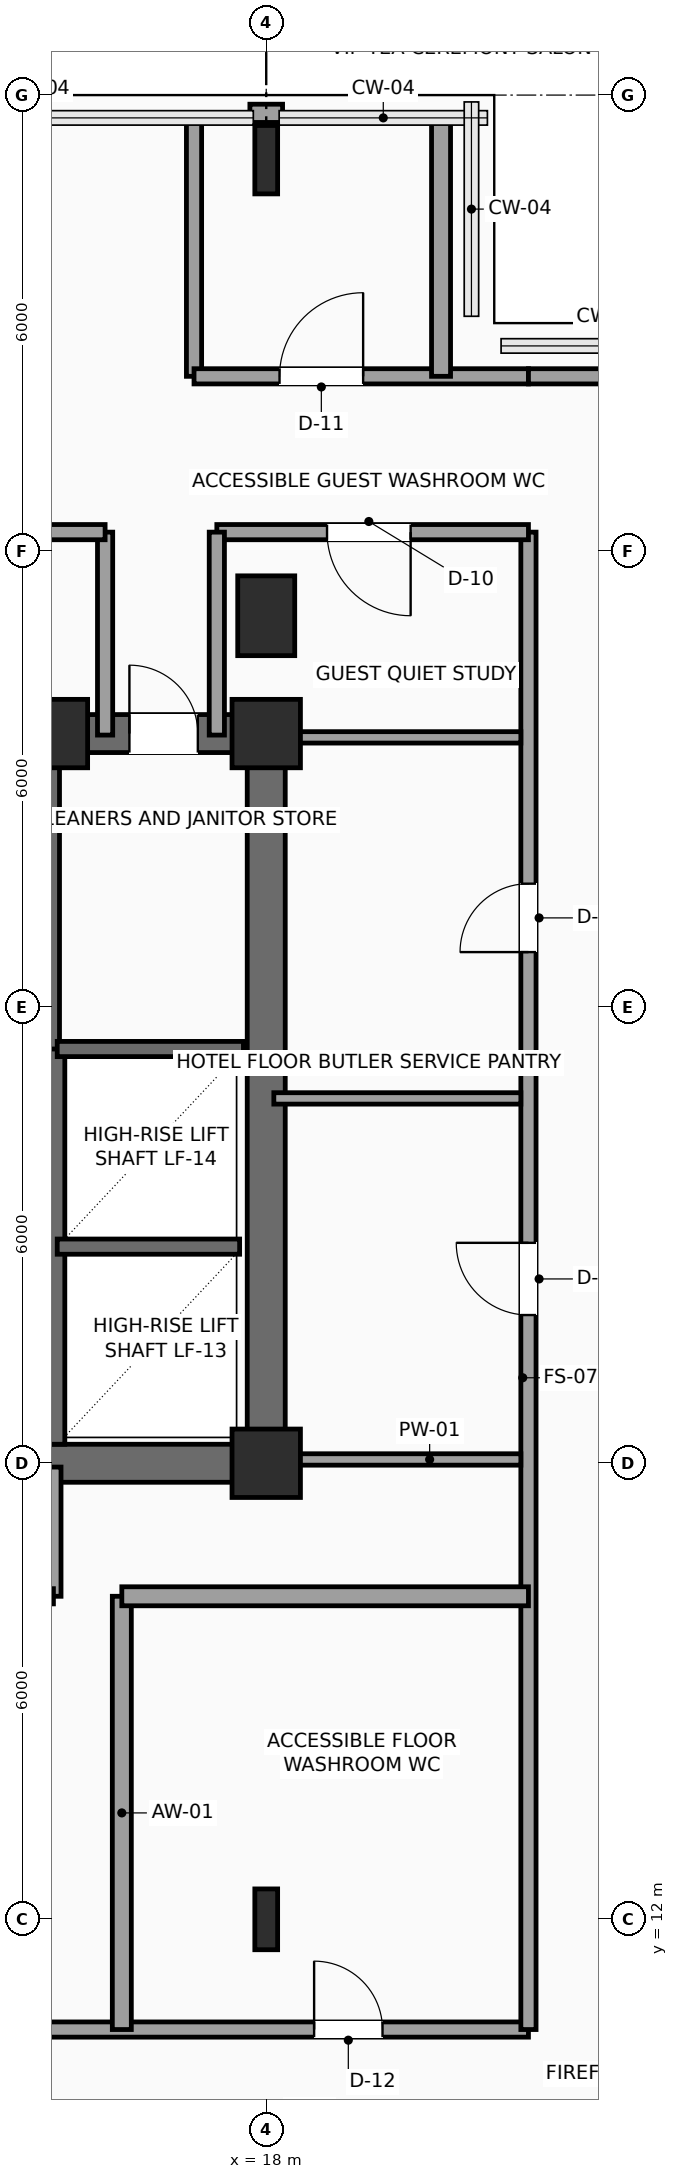
"""IFC4 building model, lengths in metres.
Left out: names, types, materials, properties, quantities, classifications, styles, units other than length and angle.
Written with IfcOpenShell. Run it as: python <this file> out.ifc"""

import sys

from ifc_helpers import new_model, si_unit, direction, frame, frame_2d, origin, origin_2d, place, context, subcontext, project, spatial, rectangle, i_section, extrude, element, fill, save


model = new_model("IFC4")
c1 = context("Model", 3, precision=1e-05, world=origin(), true_north=direction((0.0, 1.0)))
c2 = subcontext(c1, "Body", "Model", "MODEL_VIEW")
j1 = project(units=[si_unit("LENGTHUNIT", "METRE"), si_unit("PLANEANGLEUNIT", "RADIAN")], contexts=[c1])
p1 = place(None, origin())
s1 = spatial("IfcSite", under=j1, at=p1, CompositionType="ELEMENT")
p2 = place(p1, origin())
s2 = spatial("IfcBuilding", under=s1, at=p2, CompositionType="ELEMENT")
p3 = place(p2, frame((0.0, 0.0, 180.45)))
s3 = spatial("IfcBuildingStorey", under=s2, at=p3, CompositionType="ELEMENT", Elevation=180.45)
for number, where, z_axis, x_axis in (
    (1, (18.0, 18.0, 0.0), (0.0, 0.0, 1.0), (1.0, 0.0, 0.0)),
    (2, (15.2, 27.6, 0.0), (0.0, 0.0, 1.0), (1.0, 0.0, 0.0)),
    (3, (18.0, 27.6, 0.0), (0.0, 0.0, 1.0), (1.0, 0.0, 0.0)),
):
    element("IfcColumn", number, at=place(p3, frame(where, z_axis=z_axis, x_axis=x_axis)), inside=s3, PredefinedType="COLUMN", context=c2, shape_type="SweptSolid", body=[
        extrude(rectangle(XDim=0.9, YDim=0.9, at=origin_2d()), origin(), (0.0, 0.0, 1.0), 3.75),
    ])
p4 = place(p3, frame((18.0, 12.0, 0.0), z_axis=(0.0, 0.0, 1.0), x_axis=(1.0, 0.0, 0.0)))
e4 = element("IfcColumn", 4, at=p4, inside=s3, PredefinedType="COLUMN", context=c2, shape_type="SweptSolid", body=[
    extrude(i_section(OverallWidth=0.3, OverallDepth=0.8, WebThickness=0.018, FlangeThickness=0.033, FilletRadius=0.03, at=origin_2d()), origin(), (0.0, 0.0, 1.0), 3.75),
])
p5 = place(p3, frame((18.0, 29.15, 0.0), z_axis=(0.0, 0.0, 1.0), x_axis=(1.0, 0.0, 0.0)))
e5 = element("IfcColumn", 5, at=p5, inside=s3, PredefinedType="COLUMN", context=c2, shape_type="SweptSolid", body=[
    extrude(rectangle(XDim=0.75, YDim=1.05, at=origin_2d()), origin(), (0.0, 0.0, 1.0), 3.75),
])
p6 = place(p3, frame((18.0, 35.15, 0.0), z_axis=(0.0, 0.0, 1.0), x_axis=(1.0, 0.0, 0.0)))
e6 = element("IfcColumn", 6, at=p6, inside=s3, PredefinedType="COLUMN", context=c2, shape_type="SweptSolid", body=[
    extrude(i_section(OverallWidth=0.3, OverallDepth=0.9, WebThickness=0.019, FlangeThickness=0.035, FilletRadius=0.03, at=origin_2d()), origin(), (0.0, 0.0, 1.0), 3.75),
])
p7 = place(p3, frame((17.785, 35.76, 0.0), z_axis=(0.0, 0.0, 1.0), x_axis=(1.0, 0.0, 0.0)))
e7 = element("IfcWall", 7, at=p7, inside=s3, PredefinedType="SOLIDWALL", context=c2, shape_type="SweptSolid", body=[
    extrude(rectangle(XDim=0.43, YDim=0.24, at=frame_2d((0.215, 0.0))), origin(), (0.0, 0.0, 1.0), 3.54),
])
p8 = place(p3, frame((6.0, 18.0, 0.0), z_axis=(0.0, 0.0, 1.0), x_axis=(1.0, 0.0, 0.0)))
e8 = element("IfcWall", 8, at=p8, inside=s3, PredefinedType="SHEAR", context=c2, shape_type="SweptSolid", body=[
    extrude(rectangle(XDim=12.0, YDim=0.5, at=frame_2d((6.0, 0.0))), origin(), (0.0, 0.0, 1.0), 3.54),
])
p9 = place(p8, frame((7.15, 0.0, 0.0)))
e9 = element("IfcOpeningElement", 9, at=p9, cuts=e8, PredefinedType="OPENING", context=c2, shape_type="SweptSolid", body=[
    extrude(rectangle(XDim=1.6, YDim=2.3, at=frame_2d((0.8, 1.15))), frame((0.0, 0.26, 0.0), z_axis=(0.0, -1.0, 0.0), x_axis=(1.0, 0.0, 0.0)), (0.0, 0.0, 1.0), 0.52),
])
p10 = place(p3, frame((6.0, 27.6, 0.0), z_axis=(0.0, 0.0, 1.0), x_axis=(1.0, 0.0, 0.0)))
e10 = element("IfcWall", 10, at=p10, inside=s3, PredefinedType="SHEAR", context=c2, shape_type="SweptSolid", body=[
    extrude(rectangle(XDim=12.0, YDim=0.5, at=frame_2d((6.0, 0.0))), origin(), (0.0, 0.0, 1.0), 3.54),
])
p11 = place(p10, frame((10.2, 0.0, 0.0)))
e11 = element("IfcOpeningElement", 11, at=p11, cuts=e10, PredefinedType="OPENING", context=c2, shape_type="SweptSolid", body=[
    extrude(rectangle(XDim=0.9, YDim=2.15, at=frame_2d((0.45, 1.075))), frame((0.0, 0.26, 0.0), z_axis=(0.0, -1.0, 0.0), x_axis=(1.0, 0.0, 0.0)), (0.0, 0.0, 1.0), 0.52),
])
p12 = place(p3, frame((18.0, 18.0, 0.0), z_axis=(0.0, 0.0, 1.0), x_axis=(0.0, 1.0, 0.0)))
e12 = element("IfcWall", 12, at=p12, inside=s3, PredefinedType="SHEAR", context=c2, shape_type="SweptSolid", body=[
    extrude(rectangle(XDim=9.6, YDim=0.5, at=frame_2d((4.8, 0.0))), origin(), (0.0, 0.0, 1.0), 3.54),
])
p13 = place(p3, frame((15.18, 23.26, 0.0), z_axis=(0.0, 0.0, 1.0), x_axis=(0.0, 1.0, 0.0)))
e13 = element("IfcWall", 13, at=p13, inside=s3, PredefinedType="SHEAR", context=c2, shape_type="SweptSolid", body=[
    extrude(rectangle(XDim=4.04, YDim=0.2, at=frame_2d((2.02, 0.0))), origin(), (0.0, 0.0, 1.0), 3.54),
])
p14 = place(p3, frame((15.25, 18.25, 0.0), z_axis=(0.0, 0.0, 1.0), x_axis=(0.0, 1.0, 0.0)))
e14 = element("IfcWall", 14, at=p14, inside=s3, PredefinedType="SHEAR", context=c2, shape_type="SweptSolid", body=[
    extrude(rectangle(XDim=5.2, YDim=0.2, at=frame_2d((2.6, 0.0))), origin(), (0.0, 0.0, 1.0), 3.54),
])
p15 = place(p3, frame((15.25, 20.85, 0.0), z_axis=(0.0, 0.0, 1.0), x_axis=(1.0, 0.0, 0.0)))
e15 = element("IfcWall", 15, at=p15, inside=s3, PredefinedType="SHEAR", context=c2, shape_type="SweptSolid", body=[
    extrude(rectangle(XDim=2.4, YDim=0.2, at=frame_2d((1.2, 0.0))), origin(), (0.0, 0.0, 1.0), 3.54),
])
p16 = place(p3, frame((15.25, 23.45, 0.0), z_axis=(0.0, 0.0, 1.0), x_axis=(1.0, 0.0, 0.0)))
e16 = element("IfcWall", 16, at=p16, inside=s3, PredefinedType="SHEAR", context=c2, shape_type="SweptSolid", body=[
    extrude(rectangle(XDim=2.45, YDim=0.2, at=frame_2d((1.225, 0.0))), origin(), (0.0, 0.0, 1.0), 3.54),
])
p17 = place(p3, frame((15.2, 17.95, 0.0), z_axis=(0.0, 0.0, 1.0), x_axis=(0.0, -1.0, 0.0)))
e17 = element("IfcWall", 17, at=p17, inside=s3, PredefinedType="SOLIDWALL", context=c2, shape_type="SweptSolid", body=[
    extrude(rectangle(XDim=1.7, YDim=0.2, at=frame_2d((0.85, 0.0))), origin(), (0.0, 0.0, 1.0), 3.54),
])
p18 = place(p3, frame((15.2, 16.25, 0.0), z_axis=(0.0, 0.0, 1.0), x_axis=(-1.0, 0.0, 0.0)))
e18 = element("IfcWall", 18, at=p18, inside=s3, PredefinedType="SOLIDWALL", context=c2, shape_type="SweptSolid", body=[
    extrude(rectangle(XDim=4.75, YDim=0.2, at=frame_2d((2.375, 0.0))), origin(), (0.0, 0.0, 1.0), 3.54),
])
p19 = place(p3, frame((10.45, 10.55, 0.0), z_axis=(0.0, 0.0, 1.0), x_axis=(1.0, 0.0, 0.0)))
e19 = element("IfcWall", 19, at=p19, inside=s3, PredefinedType="SOLIDWALL", context=c2, shape_type="SweptSolid", body=[
    extrude(rectangle(XDim=11.0, YDim=0.2, at=frame_2d((5.5, 0.0))), origin(), (0.0, 0.0, 1.0), 3.54),
])
p20 = place(p19, frame((2.325, 0.0, 0.0)))
e20 = element("IfcOpeningElement", 20, at=p20, cuts=e19, PredefinedType="OPENING", context=c2, shape_type="SweptSolid", body=[
    extrude(rectangle(XDim=1.1, YDim=2.25, at=frame_2d((0.55, 1.125))), frame((0.0, 0.11, 0.0), z_axis=(0.0, -1.0, 0.0), x_axis=(1.0, 0.0, 0.0)), (0.0, 0.0, 1.0), 0.22),
])
p21 = place(p19, frame((8.18, 0.0, 0.0)))
e21 = element("IfcOpeningElement", 21, at=p21, cuts=e19, PredefinedType="OPENING", context=c2, shape_type="SweptSolid", body=[
    extrude(rectangle(XDim=0.9, YDim=2.1, at=frame_2d((0.45, 1.05))), frame((0.0, 0.11, 0.0), z_axis=(0.0, -1.0, 0.0), x_axis=(1.0, 0.0, 0.0)), (0.0, 0.0, 1.0), 0.22),
])
p22 = place(p3, frame((21.45, 10.55, 0.0), z_axis=(0.0, 0.0, 1.0), x_axis=(0.0, 1.0, 0.0)))
e22 = element("IfcWall", 22, at=p22, inside=s3, PredefinedType="SOLIDWALL", context=c2, shape_type="SweptSolid", body=[
    extrude(rectangle(XDim=19.7, YDim=0.2, at=frame_2d((9.85, 0.0))), origin(), (0.0, 0.0, 1.0), 3.54),
])
p23 = place(p22, frame((9.4, 0.0, 0.0)))
e23 = element("IfcOpeningElement", 23, at=p23, cuts=e22, PredefinedType="OPENING", context=c2, shape_type="SweptSolid", body=[
    extrude(rectangle(XDim=0.95, YDim=2.15, at=frame_2d((0.475, 1.075))), frame((0.0, 0.11, 0.0), z_axis=(0.0, -1.0, 0.0), x_axis=(1.0, 0.0, 0.0)), (0.0, 0.0, 1.0), 0.22),
])
p24 = place(p22, frame((14.175, 0.0, 0.0)))
e24 = element("IfcOpeningElement", 24, at=p24, cuts=e22, PredefinedType="OPENING", context=c2, shape_type="SweptSolid", body=[
    extrude(rectangle(XDim=0.9, YDim=2.1, at=frame_2d((0.45, 1.05))), frame((0.0, 0.11, 0.0), z_axis=(0.0, -1.0, 0.0), x_axis=(1.0, 0.0, 0.0)), (0.0, 0.0, 1.0), 0.22),
])
p25 = place(p3, frame((21.45, 30.25, 0.0), z_axis=(0.0, 0.0, 1.0), x_axis=(-1.0, 0.0, 0.0)))
e25 = element("IfcWall", 25, at=p25, inside=s3, PredefinedType="SOLIDWALL", context=c2, shape_type="SweptSolid", body=[
    extrude(rectangle(XDim=4.1, YDim=0.2, at=frame_2d((2.05, 0.0))), origin(), (0.0, 0.0, 1.0), 3.54),
])
p26 = place(p25, frame((1.55, 0.0, 0.0)))
e26 = element("IfcOpeningElement", 26, at=p26, cuts=e25, PredefinedType="OPENING", context=c2, shape_type="SweptSolid", body=[
    extrude(rectangle(XDim=1.1, YDim=2.25, at=frame_2d((0.55, 1.125))), frame((0.0, 0.11, 0.0), z_axis=(0.0, -1.0, 0.0), x_axis=(1.0, 0.0, 0.0)), (0.0, 0.0, 1.0), 0.22),
])
for number, where, z_axis, x_axis in (
    (27, (17.35, 30.25, 0.0), (0.0, 0.0, 1.0), (0.0, -1.0, 0.0)),
    (28, (15.88, 27.58, 0.0), (0.0, 0.0, 1.0), (0.0, 1.0, 0.0)),
):
    element("IfcWall", number, at=place(p3, frame(where, z_axis=z_axis, x_axis=x_axis)), inside=s3, PredefinedType="SOLIDWALL", context=c2, shape_type="SweptSolid", body=[
        extrude(rectangle(XDim=2.67, YDim=0.2, at=frame_2d((1.335, 0.0))), origin(), (0.0, 0.0, 1.0), 3.54),
    ])
p27 = place(p3, frame((15.88, 30.25, 0.0), z_axis=(0.0, 0.0, 1.0), x_axis=(-1.0, 0.0, 0.0)))
e29 = element("IfcWall", 29, at=p27, inside=s3, PredefinedType="SOLIDWALL", context=c2, shape_type="SweptSolid", body=[
    extrude(rectangle(XDim=7.08, YDim=0.2, at=frame_2d((3.54, 0.0))), origin(), (0.0, 0.0, 1.0), 3.54),
])
p28 = place(p27, frame((2.11, 0.0, 0.0)))
e30 = element("IfcOpeningElement", 30, at=p28, cuts=e29, PredefinedType="OPENING", context=c2, shape_type="SweptSolid", body=[
    extrude(rectangle(XDim=1.1, YDim=2.25, at=frame_2d((0.55, 1.125))), frame((0.0, 0.11, 0.0), z_axis=(0.0, -1.0, 0.0), x_axis=(1.0, 0.0, 0.0)), (0.0, 0.0, 1.0), 0.22),
])
p29 = place(p3, frame((17.05, 35.7, 0.0), z_axis=(0.0, 0.0, 1.0), x_axis=(0.0, -1.0, 0.0)))
e31 = element("IfcWall", 31, at=p29, inside=s3, PredefinedType="SOLIDWALL", context=c2, shape_type="SweptSolid", body=[
    extrude(rectangle(XDim=3.4, YDim=0.2, at=frame_2d((1.7, 0.0))), origin(), (0.0, 0.0, 1.0), 3.54),
])
p30 = place(p3, frame((17.05, 32.3, 0.0), z_axis=(0.0, 0.0, 1.0), x_axis=(1.0, 0.0, 0.0)))
e32 = element("IfcWall", 32, at=p30, inside=s3, PredefinedType="SOLIDWALL", context=c2, shape_type="SweptSolid", body=[
    extrude(rectangle(XDim=4.4, YDim=0.2, at=frame_2d((2.2, 0.0))), origin(), (0.0, 0.0, 1.0), 3.132),
])
p31 = place(p30, frame((1.125, 0.0, 0.0)))
e33 = element("IfcOpeningElement", 33, at=p31, cuts=e32, PredefinedType="OPENING", context=c2, shape_type="SweptSolid", body=[
    extrude(rectangle(XDim=1.1, YDim=2.25, at=frame_2d((0.55, 1.125))), frame((0.0, 0.11, 0.0), z_axis=(0.0, -1.0, 0.0), x_axis=(1.0, 0.0, 0.0)), (0.0, 0.0, 1.0), 0.22),
])
p32 = place(p3, frame((21.45, 32.3, 0.0), z_axis=(0.0, 0.0, 1.0), x_axis=(1.0, 0.0, 0.0)))
e34 = element("IfcWall", 34, at=p32, inside=s3, PredefinedType="SOLIDWALL", context=c2, shape_type="SweptSolid", body=[
    extrude(rectangle(XDim=2.25, YDim=0.2, at=frame_2d((1.125, 0.0))), origin(), (0.0, 0.0, 1.0), 3.54),
])
p33 = place(p3, frame((16.1, 10.55, 0.0), z_axis=(0.0, 0.0, 1.0), x_axis=(0.0, 1.0, 0.0)))
e35 = element("IfcWall", 35, at=p33, inside=s3, PredefinedType="PARTITIONING", context=c2, shape_type="SweptSolid", body=[
    extrude(rectangle(XDim=5.7, YDim=0.25, at=frame_2d((2.85, 0.0))), origin(), (0.0, 0.0, 1.0), 3.54),
])
p34 = place(p3, frame((16.1, 16.25, 0.0), z_axis=(0.0, 0.0, 1.0), x_axis=(1.0, 0.0, 0.0)))
e36 = element("IfcWall", 36, at=p34, inside=s3, PredefinedType="PARTITIONING", context=c2, shape_type="SweptSolid", body=[
    extrude(rectangle(XDim=5.35, YDim=0.25, at=frame_2d((2.675, 0.0))), origin(), (0.0, 0.0, 1.0), 3.54),
])
p35 = place(p3, frame((18.1, 18.05, 0.0), z_axis=(0.0, 0.0, 1.0), x_axis=(1.0, 0.0, 0.0)))
e37 = element("IfcWall", 37, at=p35, inside=s3, PredefinedType="PARTITIONING", context=c2, shape_type="SweptSolid", body=[
    extrude(rectangle(XDim=3.25, YDim=0.15, at=frame_2d((1.625, 0.0))), origin(), (0.0, 0.0, 1.0), 3.132),
])
for number, where, z_axis, x_axis in (
    (38, (18.1, 22.8, 0.0), (0.0, 0.0, 1.0), (1.0, 0.0, 0.0)),
    (39, (18.1, 27.55, 0.0), (0.0, 0.0, 1.0), (1.0, 0.0, 0.0)),
):
    element("IfcWall", number, at=place(p3, frame(where, z_axis=z_axis, x_axis=x_axis)), inside=s3, PredefinedType="PARTITIONING", context=c2, shape_type="SweptSolid", body=[
        extrude(rectangle(XDim=3.25, YDim=0.15, at=frame_2d((1.625, 0.0))), origin(), (0.0, 0.0, 1.0), 3.54),
    ])
p36 = place(p3, frame((20.3, 32.3, 0.0), z_axis=(0.0, 0.0, 1.0), x_axis=(0.0, 1.0, 0.0)))
e40 = element("IfcWall", 40, at=p36, inside=s3, PredefinedType="PARTITIONING", context=c2, shape_type="SweptSolid", body=[
    extrude(rectangle(XDim=3.4, YDim=0.25, at=frame_2d((1.7, 0.0))), origin(), (0.0, 0.0, 1.0), 3.54),
])
p37 = place(p11, origin())
e41 = element("IfcDoor", 41, at=p37, inside=s3, OperationType="SINGLE_SWING_LEFT", PredefinedType="DOOR", context=c2, shape_type="SweptSolid", body=[
    extrude(rectangle(XDim=0.9, YDim=2.15, at=frame_2d((0.45, 1.075))), frame((0.0, 0.025, 0.0), z_axis=(0.0, -1.0, 0.0), x_axis=(1.0, 0.0, 0.0)), (0.0, 0.0, 1.0), 0.05),
])
fill(e11, e41)
p38 = place(p21, origin())
e42 = element("IfcDoor", 42, at=p38, inside=s3, OperationType="SINGLE_SWING_LEFT", PredefinedType="DOOR", context=c2, shape_type="SweptSolid", body=[
    extrude(rectangle(XDim=0.9, YDim=2.1, at=frame_2d((0.45, 1.05))), frame((0.0, 0.025, 0.0), z_axis=(0.0, -1.0, 0.0), x_axis=(1.0, 0.0, 0.0)), (0.0, 0.0, 1.0), 0.05),
])
fill(e21, e42)
p39 = place(p23, origin())
e43 = element("IfcDoor", 43, at=p39, inside=s3, OperationType="SINGLE_SWING_RIGHT", PredefinedType="DOOR", context=c2, shape_type="SweptSolid", body=[
    extrude(rectangle(XDim=0.95, YDim=2.15, at=frame_2d((0.475, 1.075))), frame((0.0, 0.025, 0.0), z_axis=(0.0, -1.0, 0.0), x_axis=(1.0, 0.0, 0.0)), (0.0, 0.0, 1.0), 0.05),
])
fill(e23, e43)
p40 = place(p24, origin())
e44 = element("IfcDoor", 44, at=p40, inside=s3, OperationType="SINGLE_SWING_LEFT", PredefinedType="DOOR", context=c2, shape_type="SweptSolid", body=[
    extrude(rectangle(XDim=0.9, YDim=2.1, at=frame_2d((0.45, 1.05))), frame((0.0, 0.025, 0.0), z_axis=(0.0, -1.0, 0.0), x_axis=(1.0, 0.0, 0.0)), (0.0, 0.0, 1.0), 0.05),
])
fill(e24, e44)
p41 = place(p26, origin())
e45 = element("IfcDoor", 45, at=p41, inside=s3, OperationType="SINGLE_SWING_LEFT", PredefinedType="DOOR", context=c2, shape_type="SweptSolid", body=[
    extrude(rectangle(XDim=1.1, YDim=2.25, at=frame_2d((0.55, 1.125))), frame((0.0, 0.025, 0.0), z_axis=(0.0, -1.0, 0.0), x_axis=(1.0, 0.0, 0.0)), (0.0, 0.0, 1.0), 0.05),
])
fill(e26, e45)
p42 = place(p31, origin())
e46 = element("IfcDoor", 46, at=p42, inside=s3, OperationType="SINGLE_SWING_RIGHT", PredefinedType="DOOR", context=c2, shape_type="SweptSolid", body=[
    extrude(rectangle(XDim=1.1, YDim=2.25, at=frame_2d((0.55, 1.125))), frame((0.0, 0.025, 0.0), z_axis=(0.0, -1.0, 0.0), x_axis=(1.0, 0.0, 0.0)), (0.0, 0.0, 1.0), 0.05),
])
fill(e33, e46)
save(model, sys.argv[1])
